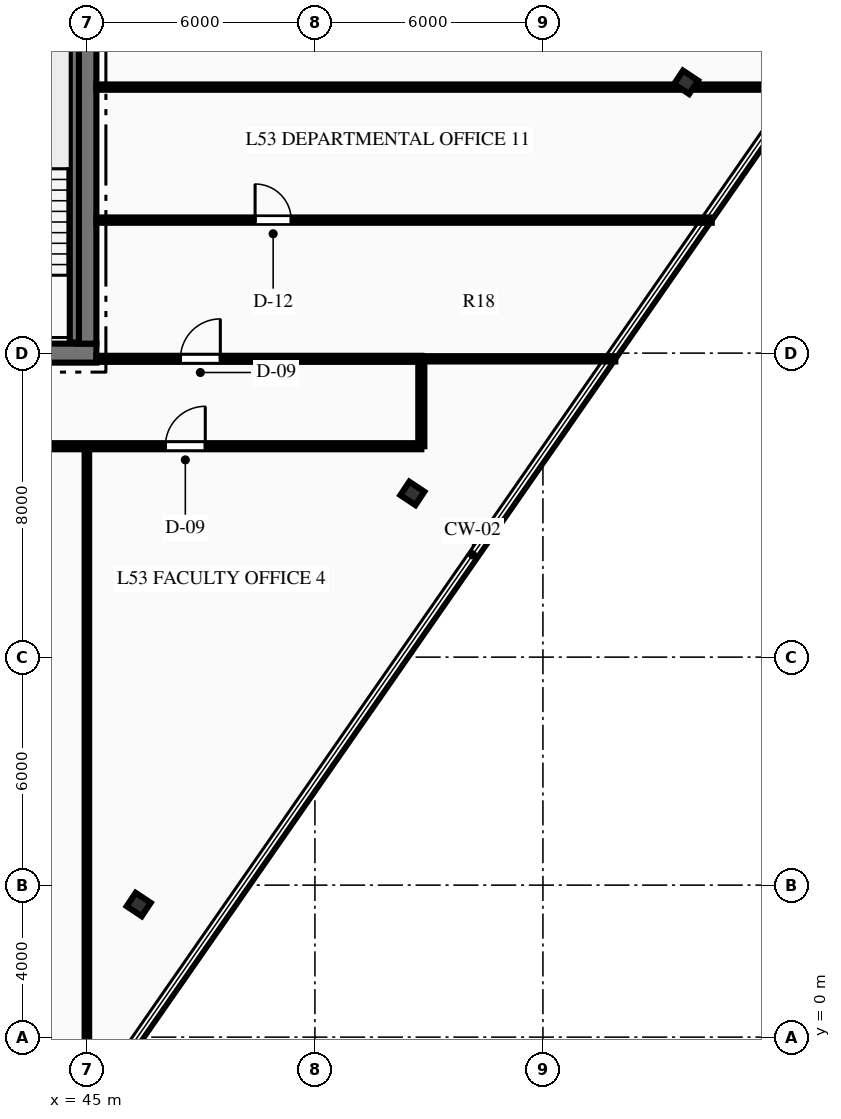
"""IFC4 building model, lengths in metres.
Left out: names, types, materials, properties, quantities, classifications, styles, units other than length and angle.
Written with IfcOpenShell. Run it as: python <this file> out.ifc"""

import sys

from ifc_helpers import new_model, si_unit, direction, frame, frame_2d, origin, origin_2d, place, context, subcontext, project, spatial, rectangle, i_section, extrude, element, fill, save


model = new_model("IFC4")
c1 = context("Model", 3, precision=1e-05, world=origin(), true_north=direction((0.0, 1.0)))
c2 = subcontext(c1, "Body", "Model", "MODEL_VIEW")
j1 = project(units=[si_unit("LENGTHUNIT", "METRE"), si_unit("PLANEANGLEUNIT", "RADIAN")], contexts=[c1])
p1 = place(None, origin())
s1 = spatial("IfcSite", under=j1, at=p1, CompositionType="ELEMENT")
p2 = place(p1, origin())
s2 = spatial("IfcBuilding", under=s1, at=p2, CompositionType="ELEMENT")
p3 = place(p2, frame((0.0, 0.0, 213.45)))
s3 = spatial("IfcBuildingStorey", under=s2, at=p3, CompositionType="ELEMENT", Elevation=213.45)
p4 = place(p3, frame((26.75, 18.0, 0.0), z_axis=(0.0, 0.0, 1.0), x_axis=(1.0, 0.0, 0.0)))
e1 = element("IfcWall", 1, at=p4, inside=s3, PredefinedType="SHEAR", context=c2, shape_type="SweptSolid", body=[
    extrude(rectangle(XDim=18.5, YDim=0.5, at=frame_2d((9.25, 0.0))), origin(), (0.0, 0.0, 1.0), 3.75),
])
p5 = place(p4, frame((7.35, 0.0, 0.0)))
e2 = element("IfcOpeningElement", 2, at=p5, cuts=e1, PredefinedType="OPENING", context=c2, shape_type="SweptSolid", body=[
    extrude(rectangle(XDim=1.1, YDim=2.15, at=frame_2d((0.55, 1.075))), frame((0.0, 0.26, 0.0), z_axis=(0.0, -1.0, 0.0), x_axis=(1.0, 0.0, 0.0)), (0.0, 0.0, 1.0), 0.52),
])
p6 = place(p4, frame((10.05, 0.0, 0.0)))
e3 = element("IfcOpeningElement", 3, at=p6, cuts=e1, PredefinedType="OPENING", context=c2, shape_type="SweptSolid", body=[
    extrude(rectangle(XDim=1.1, YDim=2.15, at=frame_2d((0.55, 1.075))), frame((0.0, 0.26, 0.0), z_axis=(0.0, -1.0, 0.0), x_axis=(1.0, 0.0, 0.0)), (0.0, 0.0, 1.0), 0.52),
])
p7 = place(p3, frame((45.0, 18.25, 0.0), z_axis=(0.0, 0.0, 1.0), x_axis=(0.0, 1.0, 0.0)))
e4 = element("IfcWall", 4, at=p7, inside=s3, PredefinedType="SHEAR", context=c2, shape_type="SweptSolid", body=[
    extrude(rectangle(XDim=15.5, YDim=0.5, at=frame_2d((7.75, 0.0))), origin(), (0.0, 0.0, 1.0), 3.75),
])
p8 = place(p7, frame((9.99, 0.0, 0.0)))
e5 = element("IfcOpeningElement", 5, at=p8, cuts=e4, PredefinedType="OPENING", context=c2, shape_type="SweptSolid", body=[
    extrude(rectangle(XDim=1.4, YDim=2.2, at=frame_2d((0.7, 1.1))), frame((0.0, 0.26, 0.0), z_axis=(0.0, -1.0, 0.0), x_axis=(1.0, 0.0, 0.0)), (0.0, 0.0, 1.0), 0.52),
])
p9 = place(p3, frame((44.67, 18.28, 0.0), z_axis=(0.0, 0.0, 1.0), x_axis=(0.0, 1.0, 0.0)))
e6 = element("IfcWall", 6, at=p9, inside=s3, PredefinedType="SHEAR", context=c2, shape_type="SweptSolid", body=[
    extrude(rectangle(XDim=8.26, YDim=0.24, at=frame_2d((4.13, 0.0))), origin(), (0.0, 0.0, 1.0), 3.75),
])
for number, where, z_axis, x_axis in (
    (7, (46.363, 3.49, 0.0), (0.0, 0.0, 1.0), (0.554, 0.832, 0.0)),
    (8, (53.564, 14.308, 0.0), (0.0, 0.0, 1.0), (0.554, 0.832, 0.0)),
    (9, (60.766, 25.126, 0.0), (0.0, 0.0, 1.0), (0.554, 0.832, 0.0)),
):
    element("IfcColumn", number, at=place(p3, frame(where, z_axis=z_axis, x_axis=x_axis)), inside=s3, PredefinedType="COLUMN", context=c2, shape_type="SweptSolid", body=[
        extrude(i_section(OverallWidth=0.424, OverallDepth=0.474, WebThickness=0.048, FlangeThickness=0.077, at=origin_2d()), origin(), (0.0, 0.0, 1.0), 3.75),
    ])
p10 = place(p3, frame((18.2, 15.55, 0.0), z_axis=(0.0, 0.0, 1.0), x_axis=(1.0, 0.0, 0.0)))
e10 = element("IfcWall", 10, at=p10, inside=s3, PredefinedType="PARTITIONING", context=c2, shape_type="SweptSolid", body=[
    extrude(rectangle(XDim=35.6, YDim=0.16, at=frame_2d((17.8, 0.0))), origin(), (0.0, 0.0, 1.0), 2.849),
])
p11 = place(p10, frame((3.305, 0.0, 0.0)))
e11 = element("IfcOpeningElement", 11, at=p11, cuts=e10, PredefinedType="OPENING", context=c2, shape_type="SweptSolid", body=[
    extrude(rectangle(XDim=1.05, YDim=2.15, at=frame_2d((0.525, 1.075))), frame((0.0, 0.09, 0.0), z_axis=(0.0, -1.0, 0.0), x_axis=(1.0, 0.0, 0.0)), (0.0, 0.0, 1.0), 0.18),
])
p12 = place(p10, frame((10.335, 0.0, 0.0)))
e12 = element("IfcOpeningElement", 12, at=p12, cuts=e10, PredefinedType="OPENING", context=c2, shape_type="SweptSolid", body=[
    extrude(rectangle(XDim=1.05, YDim=2.15, at=frame_2d((0.525, 1.075))), frame((0.0, 0.09, 0.0), z_axis=(0.0, -1.0, 0.0), x_axis=(1.0, 0.0, 0.0)), (0.0, 0.0, 1.0), 0.18),
])
p13 = place(p10, frame((17.825, 0.0, 0.0)))
e13 = element("IfcOpeningElement", 13, at=p13, cuts=e10, PredefinedType="OPENING", context=c2, shape_type="SweptSolid", body=[
    extrude(rectangle(XDim=1.05, YDim=2.15, at=frame_2d((0.525, 1.075))), frame((0.0, 0.09, 0.0), z_axis=(0.0, -1.0, 0.0), x_axis=(1.0, 0.0, 0.0)), (0.0, 0.0, 1.0), 0.18),
])
p14 = place(p10, frame((28.865, 0.0, 0.0)))
e14 = element("IfcOpeningElement", 14, at=p14, cuts=e10, PredefinedType="OPENING", context=c2, shape_type="SweptSolid", body=[
    extrude(rectangle(XDim=1.05, YDim=2.15, at=frame_2d((0.525, 1.075))), frame((0.0, 0.09, 0.0), z_axis=(0.0, -1.0, 0.0), x_axis=(1.0, 0.0, 0.0)), (0.0, 0.0, 1.0), 0.18),
])
p15 = place(p3, frame((45.25, 17.85, 0.0), z_axis=(0.0, 0.0, 1.0), x_axis=(1.0, 0.0, 0.0)))
e15 = element("IfcWall", 15, at=p15, inside=s3, PredefinedType="PARTITIONING", context=c2, shape_type="SweptSolid", body=[
    extrude(rectangle(XDim=8.55, YDim=0.16, at=frame_2d((4.275, 0.0))), origin(), (0.0, 0.0, 1.0), 3.47),
])
p16 = place(p15, frame((2.211, 0.0, 0.0)))
e16 = element("IfcOpeningElement", 16, at=p16, cuts=e15, PredefinedType="OPENING", context=c2, shape_type="SweptSolid", body=[
    extrude(rectangle(XDim=1.05, YDim=2.15, at=frame_2d((0.525, 1.075))), frame((0.0, 0.09, 0.0), z_axis=(0.0, -1.0, 0.0), x_axis=(1.0, 0.0, 0.0)), (0.0, 0.0, 1.0), 0.18),
])
p17 = place(p3, frame((53.8, 15.55, 0.0), z_axis=(0.0, 0.0, 1.0), x_axis=(0.0, 1.0, 0.0)))
e17 = element("IfcWall", 17, at=p17, inside=s3, PredefinedType="PARTITIONING", context=c2, shape_type="SweptSolid", body=[
    extrude(rectangle(XDim=2.3, YDim=0.16, at=frame_2d((1.15, 0.0))), origin(), (0.0, 0.0, 1.0), 3.47),
])
p18 = place(p3, frame((53.8, 17.85, 0.0), z_axis=(0.0, 0.0, 1.0), x_axis=(1.0, 0.0, 0.0)))
e18 = element("IfcWall", 18, at=p18, inside=s3, PredefinedType="PARTITIONING", context=c2, shape_type="SweptSolid", body=[
    extrude(rectangle(XDim=5.105, YDim=0.14, at=frame_2d((2.553, 0.0))), origin(), (0.0, 0.0, 1.0), 3.47),
])
p19 = place(p3, frame((45.0, -2.157, 0.0), z_axis=(0.0, 0.0, 1.0), x_axis=(0.0, 1.0, 0.0)))
e19 = element("IfcWall", 19, at=p19, inside=s3, PredefinedType="PARTITIONING", context=c2, shape_type="SweptSolid", body=[
    extrude(rectangle(XDim=17.707, YDim=0.12, at=frame_2d((8.854, 0.0))), origin(), (0.0, 0.0, 1.0), 2.849),
])
p20 = place(p3, frame((45.25, 21.5, 0.0), z_axis=(0.0, 0.0, 1.0), x_axis=(1.0, 0.0, 0.0)))
e20 = element("IfcWall", 20, at=p20, inside=s3, PredefinedType="PARTITIONING", context=c2, shape_type="SweptSolid", body=[
    extrude(rectangle(XDim=16.192, YDim=0.14, at=frame_2d((8.096, 0.0))), origin(), (0.0, 0.0, 1.0), 3.47),
])
p21 = place(p20, frame((4.176, 0.0, 0.0)))
e21 = element("IfcOpeningElement", 21, at=p21, cuts=e20, PredefinedType="OPENING", context=c2, shape_type="SweptSolid", body=[
    extrude(rectangle(XDim=0.95, YDim=2.15, at=frame_2d((0.475, 1.075))), frame((0.0, 0.08, 0.0), z_axis=(0.0, -1.0, 0.0), x_axis=(1.0, 0.0, 0.0)), (0.0, 0.0, 1.0), 0.16),
])
p22 = place(p3, frame((45.25, 25.0, 0.0), z_axis=(0.0, 0.0, 1.0), x_axis=(1.0, 0.0, 0.0)))
e22 = element("IfcWall", 22, at=p22, inside=s3, PredefinedType="PARTITIONING", context=c2, shape_type="SweptSolid", body=[
    extrude(rectangle(XDim=18.625, YDim=0.14, at=frame_2d((9.312, 0.0))), origin(), (0.0, 0.0, 1.0), 2.849),
])
p23 = place(p14, origin())
e23 = element("IfcDoor", 23, at=p23, inside=s3, OperationType="SINGLE_SWING_RIGHT", PredefinedType="DOOR", context=c2, shape_type="SweptSolid", body=[
    extrude(rectangle(XDim=1.05, YDim=2.15, at=frame_2d((0.525, 1.075))), frame((0.0, 0.025, 0.0), z_axis=(0.0, -1.0, 0.0), x_axis=(1.0, 0.0, 0.0)), (0.0, 0.0, 1.0), 0.05),
])
fill(e14, e23)
p24 = place(p16, origin())
e24 = element("IfcDoor", 24, at=p24, inside=s3, OperationType="SINGLE_SWING_RIGHT", PredefinedType="DOOR", context=c2, shape_type="SweptSolid", body=[
    extrude(rectangle(XDim=1.05, YDim=2.15, at=frame_2d((0.525, 1.075))), frame((0.0, 0.025, 0.0), z_axis=(0.0, -1.0, 0.0), x_axis=(1.0, 0.0, 0.0)), (0.0, 0.0, 1.0), 0.05),
])
fill(e16, e24)
p25 = place(p21, origin())
e25 = element("IfcDoor", 25, at=p25, inside=s3, OperationType="SINGLE_SWING_LEFT", PredefinedType="DOOR", context=c2, shape_type="SweptSolid", body=[
    extrude(rectangle(XDim=0.95, YDim=2.15, at=frame_2d((0.475, 1.075))), frame((0.0, 0.025, 0.0), z_axis=(0.0, -1.0, 0.0), x_axis=(1.0, 0.0, 0.0)), (0.0, 0.0, 1.0), 0.05),
])
fill(e21, e25)
save(model, sys.argv[1])
